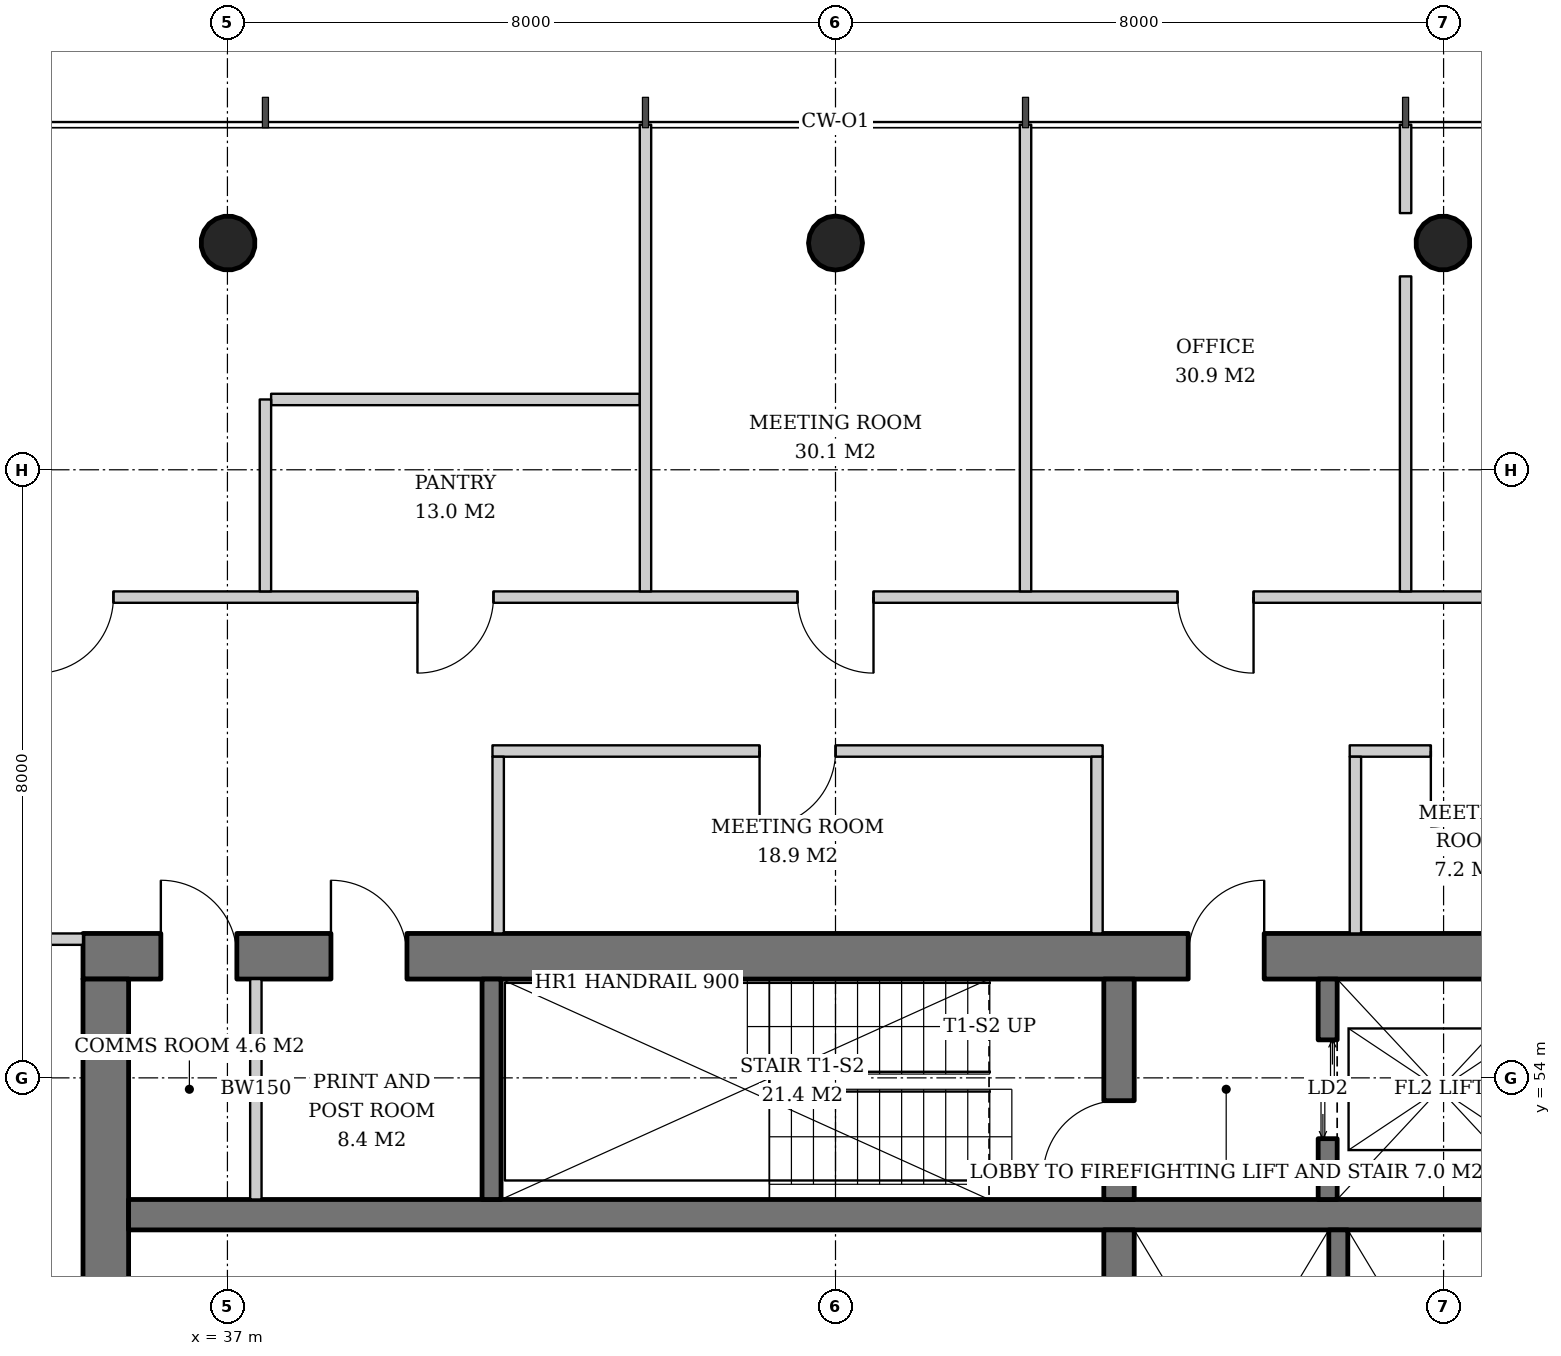
"""IFC4 building model, lengths in metres.
Left out: names, types, materials, properties, quantities, classifications, styles, units other than length and angle.
Written with IfcOpenShell. Run it as: python <this file> out.ifc"""

import sys

from ifc_helpers import new_model, si_unit, direction, frame, frame_2d, origin, origin_2d, place, context, subcontext, project, spatial, rectangle, hollow_circle, extrude, element, fill, save


model = new_model("IFC4")
c1 = context("Model", 3, precision=1e-05, world=origin(), true_north=direction((0.0, 1.0)))
c2 = subcontext(c1, "Body", "Model", "MODEL_VIEW")
j1 = project(units=[si_unit("LENGTHUNIT", "METRE"), si_unit("PLANEANGLEUNIT", "RADIAN")], contexts=[c1])
p1 = place(None, origin())
s1 = spatial("IfcSite", under=j1, at=p1, CompositionType="ELEMENT")
p2 = place(p1, origin())
s2 = spatial("IfcBuilding", under=s1, at=p2, CompositionType="ELEMENT")
p3 = place(p2, frame((0.0, 0.0, 176.8)))
s3 = spatial("IfcBuildingStorey", under=s2, at=p3, CompositionType="ELEMENT", Elevation=176.8)
p4 = place(p3, frame((53.011, 65.021, 0.0), z_axis=(-0.015987204877, -0.031974409754, 0.999360818924), x_axis=(0.894427191, -0.4472135955, 0.0)))
e1 = element("IfcColumn", 1, at=p4, inside=s3, PredefinedType="COLUMN", context=c2, shape_type="SweptSolid", body=[
    extrude(hollow_circle(Radius=0.355, WallThickness=0.025, at=origin_2d()), origin(), (0.0, 0.0, 1.0), 3.802),
])
p5 = place(p3, frame((45.0, 65.021, 0.0), z_axis=(0.0, -0.031978496719, 0.999488557087), x_axis=(1.0, 0.0, 0.0)))
e2 = element("IfcColumn", 2, at=p5, inside=s3, PredefinedType="COLUMN", context=c2, shape_type="SweptSolid", body=[
    extrude(hollow_circle(Radius=0.355, WallThickness=0.025, at=origin_2d()), origin(), (0.0, 0.0, 1.0), 3.802),
])
p6 = place(p3, frame((36.989, 65.021, 0.0), z_axis=(0.015987204877, -0.031974409754, 0.999360818924), x_axis=(0.894427191, 0.4472135955, 0.0)))
e3 = element("IfcColumn", 3, at=p6, inside=s3, PredefinedType="COLUMN", context=c2, shape_type="SweptSolid", body=[
    extrude(hollow_circle(Radius=0.355, WallThickness=0.025, at=origin_2d()), origin(), (0.0, 0.0, 1.0), 3.802),
])
p7 = place(p3, frame((35.1, 55.6, 0.0), z_axis=(0.0, 0.0, 1.0), x_axis=(1.0, 0.0, 0.0)))
e4 = element("IfcWall", 4, at=p7, inside=s3, PredefinedType="SHEAR", context=c2, shape_type="SweptSolid", body=[
    extrude(rectangle(XDim=19.8, YDim=0.6, at=frame_2d((9.9, 0.0))), origin(), (0.0, 0.0, 1.0), 3.8),
])
p8 = place(p7, frame((14.54, 0.0, 0.0)))
e5 = element("IfcOpeningElement", 5, at=p8, cuts=e4, PredefinedType="OPENING", context=c2, shape_type="SweptSolid", body=[
    extrude(rectangle(XDim=1.0, YDim=2.1, at=frame_2d((0.5, 1.05))), frame((0.0, 0.31, 0.0), z_axis=(0.0, -1.0, 0.0), x_axis=(1.0, 0.0, 0.0)), (0.0, 0.0, 1.0), 0.62),
])
p9 = place(p7, frame((1.024, 0.0, 0.0)))
e6 = element("IfcOpeningElement", 6, at=p9, cuts=e4, PredefinedType="OPENING", context=c2, shape_type="SweptSolid", body=[
    extrude(rectangle(XDim=1.0, YDim=2.1, at=frame_2d((0.5, 1.05))), frame((0.0, 0.31, 0.0), z_axis=(0.0, -1.0, 0.0), x_axis=(1.0, 0.0, 0.0)), (0.0, 0.0, 1.0), 0.62),
])
p10 = place(p7, frame((3.262, 0.0, 0.0)))
e7 = element("IfcOpeningElement", 7, at=p10, cuts=e4, PredefinedType="OPENING", context=c2, shape_type="SweptSolid", body=[
    extrude(rectangle(XDim=1.0, YDim=2.1, at=frame_2d((0.5, 1.05))), frame((0.0, 0.31, 0.0), z_axis=(0.0, -1.0, 0.0), x_axis=(1.0, 0.0, 0.0)), (0.0, 0.0, 1.0), 0.62),
])
p11 = place(p3, frame((35.4, 36.7, 0.0), z_axis=(0.0, 0.0, 1.0), x_axis=(0.0, 1.0, 0.0)))
e8 = element("IfcWall", 8, at=p11, inside=s3, PredefinedType="SHEAR", context=c2, shape_type="SweptSolid", body=[
    extrude(rectangle(XDim=18.6, YDim=0.6, at=frame_2d((9.3, 0.0))), origin(), (0.0, 0.0, 1.0), 3.8),
])
p12 = place(p11, frame((8.4, 0.0, 0.0)))
e9 = element("IfcOpeningElement", 9, at=p12, cuts=e8, PredefinedType="OPENING", context=c2, shape_type="SweptSolid", body=[
    extrude(rectangle(XDim=1.8, YDim=2.4, at=frame_2d((0.9, 1.2))), frame((0.0, 0.31, 0.0), z_axis=(0.0, -1.0, 0.0), x_axis=(1.0, 0.0, 0.0)), (0.0, 0.0, 1.0), 0.62),
])
p13 = place(p3, frame((35.7, 52.2, 0.0), z_axis=(0.0, 0.0, 1.0), x_axis=(1.0, 0.0, 0.0)))
e10 = element("IfcWall", 10, at=p13, inside=s3, PredefinedType="SHEAR", context=c2, shape_type="SweptSolid", body=[
    extrude(rectangle(XDim=18.6, YDim=0.4, at=frame_2d((9.3, 0.0))), origin(), (0.0, 0.0, 1.0), 3.8),
])
p14 = place(p3, frame((48.73, 40.0, 0.0), z_axis=(0.0, 0.0, 1.0), x_axis=(0.0, 1.0, 0.0)))
e11 = element("IfcWall", 11, at=p14, inside=s3, PredefinedType="SHEAR", context=c2, shape_type="SweptSolid", body=[
    extrude(rectangle(XDim=12.0, YDim=0.4, at=frame_2d((6.0, 0.0))), origin(), (0.0, 0.0, 1.0), 3.8),
])
p15 = place(p3, frame((48.73, 52.4, 0.0), z_axis=(0.0, 0.0, 1.0), x_axis=(0.0, 1.0, 0.0)))
e12 = element("IfcWall", 12, at=p15, inside=s3, PredefinedType="SHEAR", context=c2, shape_type="SweptSolid", body=[
    extrude(rectangle(XDim=2.9, YDim=0.4, at=frame_2d((1.45, 0.0))), origin(), (0.0, 0.0, 1.0), 3.8),
])
p16 = place(p15, frame((0.3, 0.0, 0.0)))
e13 = element("IfcOpeningElement", 13, at=p16, cuts=e12, PredefinedType="OPENING", context=c2, shape_type="SweptSolid", body=[
    extrude(rectangle(XDim=1.0, YDim=2.1, at=frame_2d((0.5, 1.05))), frame((0.0, 0.21, 0.0), z_axis=(0.0, -1.0, 0.0), x_axis=(1.0, 0.0, 0.0)), (0.0, 0.0, 1.0), 0.42),
])
p17 = place(p3, frame((40.475, 52.4, 0.0), z_axis=(0.0, 0.0, 1.0), x_axis=(0.0, 1.0, 0.0)))
e14 = element("IfcWall", 14, at=p17, inside=s3, PredefinedType="SHEAR", context=c2, shape_type="SweptSolid", body=[
    extrude(rectangle(XDim=2.9, YDim=0.25, at=frame_2d((1.45, 0.0))), origin(), (0.0, 0.0, 1.0), 3.8),
])
p18 = place(p3, frame((51.475, 52.4, 0.0), z_axis=(0.0, 0.0, 1.0), x_axis=(0.0, 1.0, 0.0)))
e15 = element("IfcWall", 15, at=p18, inside=s3, PredefinedType="SHEAR", context=c2, shape_type="SweptSolid", body=[
    extrude(rectangle(XDim=2.9, YDim=0.25, at=frame_2d((1.45, 0.0))), origin(), (0.0, 0.0, 1.0), 3.8),
])
p19 = place(p18, frame((0.8, 0.0, 0.0)))
e16 = element("IfcOpeningElement", 16, at=p19, cuts=e15, PredefinedType="OPENING", context=c2, shape_type="SweptSolid", body=[
    extrude(rectangle(XDim=1.3, YDim=2.2, at=frame_2d((0.65, 1.1))), frame((0.0, 0.135, 0.0), z_axis=(0.0, -1.0, 0.0), x_axis=(1.0, 0.0, 0.0)), (0.0, 0.0, 1.0), 0.27),
])
p20 = place(p3, frame((51.615, 47.75, 0.0), z_axis=(0.0, 0.0, 1.0), x_axis=(0.0, 1.0, 0.0)))
e17 = element("IfcWall", 17, at=p20, inside=s3, PredefinedType="SHEAR", context=c2, shape_type="SweptSolid", body=[
    extrude(rectangle(XDim=4.25, YDim=0.25, at=frame_2d((2.125, 0.0))), origin(), (0.0, 0.0, 1.0), 3.8),
])
p21 = place(p3, frame((37.374, 52.4, 0.0), z_axis=(0.0, 0.0, 1.0), x_axis=(0.0, 1.0, 0.0)))
e18 = element("IfcWall", 18, at=p21, inside=s3, PredefinedType="SOLIDWALL", context=c2, shape_type="SweptSolid", body=[
    extrude(rectangle(XDim=2.9, YDim=0.15, at=frame_2d((1.45, 0.0))), origin(), (0.0, 0.0, 1.0), 3.62),
])
p22 = place(p3, frame((54.9, 58.3, 0.0), z_axis=(0.0, 0.0, 1.0), x_axis=(-1.0, 0.0, 0.0)))
e19 = element("IfcWall", 19, at=p22, inside=s3, PredefinedType="PARTITIONING", context=c2, shape_type="SweptSolid", body=[
    extrude(rectangle(XDim=3.135, YDim=0.15, at=frame_2d((1.567, 0.0))), origin(), (0.0, 0.0, 1.0), 2.92),
])
p23 = place(p22, frame((1.067, 0.0, 0.0)))
e20 = element("IfcOpeningElement", 20, at=p23, cuts=e19, PredefinedType="OPENING", context=c2, shape_type="SweptSolid", body=[
    extrude(rectangle(XDim=1.0, YDim=2.1, at=frame_2d((0.5, 1.05))), frame((0.0, 0.085, 0.0), z_axis=(0.0, -1.0, 0.0), x_axis=(1.0, 0.0, 0.0)), (0.0, 0.0, 1.0), 0.17),
])
p24 = place(p3, frame((51.84, 55.9, 0.0), z_axis=(0.0, 0.0, 1.0), x_axis=(0.0, 1.0, 0.0)))
e21 = element("IfcWall", 21, at=p24, inside=s3, PredefinedType="PARTITIONING", context=c2, shape_type="SweptSolid", body=[
    extrude(rectangle(XDim=2.325, YDim=0.15, at=frame_2d((1.163, 0.0))), origin(), (0.0, 0.0, 1.0), 3.62),
])
p25 = place(p3, frame((48.515, 58.3, 0.0), z_axis=(0.0, 0.0, 1.0), x_axis=(-1.0, 0.0, 0.0)))
e22 = element("IfcWall", 22, at=p25, inside=s3, PredefinedType="PARTITIONING", context=c2, shape_type="SweptSolid", body=[
    extrude(rectangle(XDim=8.028, YDim=0.15, at=frame_2d((4.014, 0.0))), origin(), (0.0, 0.0, 1.0), 2.867),
])
p26 = place(p25, frame((3.514, 0.0, 0.0)))
e23 = element("IfcOpeningElement", 23, at=p26, cuts=e22, PredefinedType="OPENING", context=c2, shape_type="SweptSolid", body=[
    extrude(rectangle(XDim=1.0, YDim=2.1, at=frame_2d((0.5, 1.05))), frame((0.0, 0.085, 0.0), z_axis=(0.0, -1.0, 0.0), x_axis=(1.0, 0.0, 0.0)), (0.0, 0.0, 1.0), 0.17),
])
for number, where, z_axis, x_axis in (
    (24, (48.44, 55.9, 0.0), (0.0, 0.0, 1.0), (0.0, 1.0, 0.0)),
    (25, (40.562, 55.9, 0.0), (0.0, 0.0, 1.0), (0.0, 1.0, 0.0)),
):
    element("IfcWall", number, at=place(p3, frame(where, z_axis=z_axis, x_axis=x_axis)), inside=s3, PredefinedType="PARTITIONING", context=c2, shape_type="SweptSolid", body=[
        extrude(rectangle(XDim=2.325, YDim=0.15, at=frame_2d((1.163, 0.0))), origin(), (0.0, 0.0, 1.0), 3.62),
    ])
p27 = place(p3, frame((35.1, 55.825, 0.0), z_axis=(0.0, 0.0, 1.0), x_axis=(-1.0, 0.0, 0.0)))
e26 = element("IfcWall", 26, at=p27, inside=s3, PredefinedType="PARTITIONING", context=c2, shape_type="SweptSolid", body=[
    extrude(rectangle(XDim=2.325, YDim=0.15, at=frame_2d((1.163, 0.0))), origin(), (0.0, 0.0, 1.0), 2.867),
])
p28 = place(p3, frame((42.425, 62.925, 0.0), z_axis=(0.0, 0.0, 1.0), x_axis=(-1.0, 0.0, 0.0)))
e27 = element("IfcWall", 27, at=p28, inside=s3, PredefinedType="PARTITIONING", context=c2, shape_type="SweptSolid", body=[
    extrude(rectangle(XDim=4.85, YDim=0.15, at=frame_2d((2.425, 0.0))), origin(), (0.0, 0.0, 1.0), 2.867),
])
p29 = place(p3, frame((58.786, 60.325, 0.0), z_axis=(0.0, 0.0, 1.0), x_axis=(-1.0, 0.0, 0.0)))
e28 = element("IfcWall", 28, at=p29, inside=s3, PredefinedType="PARTITIONING", context=c2, shape_type="SweptSolid", body=[
    extrude(rectangle(XDim=27.572, YDim=0.15, at=frame_2d((13.786, 0.0))), origin(), (0.0, 0.0, 1.0), 2.867),
])
p30 = place(p29, frame((3.286, 0.0, 0.0)))
e29 = element("IfcOpeningElement", 29, at=p30, cuts=e28, PredefinedType="OPENING", context=c2, shape_type="SweptSolid", body=[
    extrude(rectangle(XDim=1.0, YDim=2.1, at=frame_2d((0.5, 1.05))), frame((0.0, 0.085, 0.0), z_axis=(0.0, -1.0, 0.0), x_axis=(1.0, 0.0, 0.0)), (0.0, 0.0, 1.0), 0.17),
])
p31 = place(p29, frame((8.286, 0.0, 0.0)))
e30 = element("IfcOpeningElement", 30, at=p31, cuts=e28, PredefinedType="OPENING", context=c2, shape_type="SweptSolid", body=[
    extrude(rectangle(XDim=1.0, YDim=2.1, at=frame_2d((0.5, 1.05))), frame((0.0, 0.085, 0.0), z_axis=(0.0, -1.0, 0.0), x_axis=(1.0, 0.0, 0.0)), (0.0, 0.0, 1.0), 0.17),
])
p32 = place(p29, frame((13.286, 0.0, 0.0)))
e31 = element("IfcOpeningElement", 31, at=p32, cuts=e28, PredefinedType="OPENING", context=c2, shape_type="SweptSolid", body=[
    extrude(rectangle(XDim=1.0, YDim=2.1, at=frame_2d((0.5, 1.05))), frame((0.0, 0.085, 0.0), z_axis=(0.0, -1.0, 0.0), x_axis=(1.0, 0.0, 0.0)), (0.0, 0.0, 1.0), 0.17),
])
p33 = place(p29, frame((18.286, 0.0, 0.0)))
e32 = element("IfcOpeningElement", 32, at=p33, cuts=e28, PredefinedType="OPENING", context=c2, shape_type="SweptSolid", body=[
    extrude(rectangle(XDim=1.0, YDim=2.1, at=frame_2d((0.5, 1.05))), frame((0.0, 0.085, 0.0), z_axis=(0.0, -1.0, 0.0), x_axis=(1.0, 0.0, 0.0)), (0.0, 0.0, 1.0), 0.17),
])
p34 = place(p29, frame((23.286, 0.0, 0.0)))
e33 = element("IfcOpeningElement", 33, at=p34, cuts=e28, PredefinedType="OPENING", context=c2, shape_type="SweptSolid", body=[
    extrude(rectangle(XDim=1.0, YDim=2.1, at=frame_2d((0.5, 1.05))), frame((0.0, 0.085, 0.0), z_axis=(0.0, -1.0, 0.0), x_axis=(1.0, 0.0, 0.0)), (0.0, 0.0, 1.0), 0.17),
])
p35 = place(p3, frame((52.5, 60.4, 0.0), z_axis=(0.0, 0.0, 1.0), x_axis=(0.0, 1.0, 0.0)))
e34 = element("IfcWall", 34, at=p35, inside=s3, PredefinedType="PARTITIONING", context=c2, shape_type="SweptSolid", body=[
    extrude(rectangle(XDim=4.145, YDim=0.15, at=frame_2d((2.072, 0.0))), origin(), (0.0, 0.0, 1.0), 3.62),
])
p36 = place(p3, frame((52.5, 65.377, 0.0), z_axis=(0.0, 0.0, 1.0), x_axis=(0.0, 1.0, 0.0)))
e35 = element("IfcWall", 35, at=p36, inside=s3, PredefinedType="PARTITIONING", context=c2, shape_type="SweptSolid", body=[
    extrude(rectangle(XDim=1.163, YDim=0.15, at=frame_2d((0.582, 0.0))), origin(), (0.0, 0.0, 1.0), 3.62),
])
p37 = place(p3, frame((47.5, 60.4, 0.0), z_axis=(0.0, 0.0, 1.0), x_axis=(0.0, 1.0, 0.0)))
e36 = element("IfcWall", 36, at=p37, inside=s3, PredefinedType="PARTITIONING", context=c2, shape_type="SweptSolid", body=[
    extrude(rectangle(XDim=6.14, YDim=0.15, at=frame_2d((3.07, 0.0))), origin(), (0.0, 0.0, 1.0), 3.12),
])
p38 = place(p3, frame((42.5, 60.4, 0.0), z_axis=(0.0, 0.0, 1.0), x_axis=(0.0, 1.0, 0.0)))
e37 = element("IfcWall", 37, at=p38, inside=s3, PredefinedType="PARTITIONING", context=c2, shape_type="SweptSolid", body=[
    extrude(rectangle(XDim=6.14, YDim=0.15, at=frame_2d((3.07, 0.0))), origin(), (0.0, 0.0, 1.0), 2.867),
])
p39 = place(p3, frame((37.5, 60.4, 0.0), z_axis=(0.0, 0.0, 1.0), x_axis=(0.0, 1.0, 0.0)))
e38 = element("IfcWall", 38, at=p39, inside=s3, PredefinedType="PARTITIONING", context=c2, shape_type="SweptSolid", body=[
    extrude(rectangle(XDim=2.525, YDim=0.15, at=frame_2d((1.263, 0.0))), origin(), (0.0, 0.0, 1.0), 3.62),
])
p40 = place(p19, origin())
e39 = element("IfcDoor", 39, at=p40, inside=s3, OperationType="DOUBLE_DOOR_SLIDING", PredefinedType="DOOR", context=c2, shape_type="SweptSolid", body=[
    extrude(rectangle(XDim=1.3, YDim=2.2, at=frame_2d((0.65, 1.1))), frame((0.0, 0.025, 0.0), z_axis=(0.0, -1.0, 0.0), x_axis=(1.0, 0.0, 0.0)), (0.0, 0.0, 1.0), 0.05),
])
fill(e16, e39)
p41 = place(p16, origin())
e40 = element("IfcDoor", 40, at=p41, inside=s3, OperationType="SINGLE_SWING_LEFT", PredefinedType="DOOR", context=c2, shape_type="SweptSolid", body=[
    extrude(rectangle(XDim=1.0, YDim=2.1, at=frame_2d((0.5, 1.05))), frame((0.0, 0.025, 0.0), z_axis=(0.0, -1.0, 0.0), x_axis=(1.0, 0.0, 0.0)), (0.0, 0.0, 1.0), 0.05),
])
fill(e13, e40)
p42 = place(p8, origin())
e41 = element("IfcDoor", 41, at=p42, inside=s3, OperationType="SINGLE_SWING_RIGHT", PredefinedType="DOOR", context=c2, shape_type="SweptSolid", body=[
    extrude(rectangle(XDim=1.0, YDim=2.1, at=frame_2d((0.5, 1.05))), frame((0.0, 0.025, 0.0), z_axis=(0.0, -1.0, 0.0), x_axis=(1.0, 0.0, 0.0)), (0.0, 0.0, 1.0), 0.05),
])
fill(e5, e41)
p43 = place(p9, origin())
e42 = element("IfcDoor", 42, at=p43, inside=s3, OperationType="SINGLE_SWING_LEFT", PredefinedType="DOOR", context=c2, shape_type="SweptSolid", body=[
    extrude(rectangle(XDim=1.0, YDim=2.1, at=frame_2d((0.5, 1.05))), frame((0.0, -0.24, 0.0), z_axis=(0.0, -1.0, 0.0), x_axis=(1.0, 0.0, 0.0)), (0.0, 0.0, 1.0), 0.05),
])
fill(e6, e42)
p44 = place(p10, origin())
e43 = element("IfcDoor", 43, at=p44, inside=s3, OperationType="SINGLE_SWING_LEFT", PredefinedType="DOOR", context=c2, shape_type="SweptSolid", body=[
    extrude(rectangle(XDim=1.0, YDim=2.1, at=frame_2d((0.5, 1.05))), frame((0.0, -0.24, 0.0), z_axis=(0.0, -1.0, 0.0), x_axis=(1.0, 0.0, 0.0)), (0.0, 0.0, 1.0), 0.05),
])
fill(e7, e43)
p45 = place(p23, origin())
e44 = element("IfcDoor", 44, at=p45, inside=s3, OperationType="SINGLE_SWING_RIGHT", PredefinedType="DOOR", context=c2, shape_type="SweptSolid", body=[
    extrude(rectangle(XDim=1.0, YDim=2.1, at=frame_2d((0.5, 1.05))), frame((0.0, 0.025, 0.0), z_axis=(0.0, -1.0, 0.0), x_axis=(1.0, 0.0, 0.0)), (0.0, 0.0, 1.0), 0.05),
])
fill(e20, e44)
p46 = place(p26, origin())
e45 = element("IfcDoor", 45, at=p46, inside=s3, OperationType="SINGLE_SWING_RIGHT", PredefinedType="DOOR", context=c2, shape_type="SweptSolid", body=[
    extrude(rectangle(XDim=1.0, YDim=2.1, at=frame_2d((0.5, 1.05))), frame((0.0, 0.025, 0.0), z_axis=(0.0, -1.0, 0.0), x_axis=(1.0, 0.0, 0.0)), (0.0, 0.0, 1.0), 0.05),
])
fill(e23, e45)
p47 = place(p31, origin())
e46 = element("IfcDoor", 46, at=p47, inside=s3, OperationType="SINGLE_SWING_LEFT", PredefinedType="DOOR", context=c2, shape_type="SweptSolid", body=[
    extrude(rectangle(XDim=1.0, YDim=2.1, at=frame_2d((0.5, 1.05))), frame((0.0, 0.025, 0.0), z_axis=(0.0, -1.0, 0.0), x_axis=(1.0, 0.0, 0.0)), (0.0, 0.0, 1.0), 0.05),
])
fill(e30, e46)
p48 = place(p32, origin())
e47 = element("IfcDoor", 47, at=p48, inside=s3, OperationType="SINGLE_SWING_LEFT", PredefinedType="DOOR", context=c2, shape_type="SweptSolid", body=[
    extrude(rectangle(XDim=1.0, YDim=2.1, at=frame_2d((0.5, 1.05))), frame((0.0, 0.025, 0.0), z_axis=(0.0, -1.0, 0.0), x_axis=(1.0, 0.0, 0.0)), (0.0, 0.0, 1.0), 0.05),
])
fill(e31, e47)
p49 = place(p33, origin())
e48 = element("IfcDoor", 48, at=p49, inside=s3, OperationType="SINGLE_SWING_RIGHT", PredefinedType="DOOR", context=c2, shape_type="SweptSolid", body=[
    extrude(rectangle(XDim=1.0, YDim=2.1, at=frame_2d((0.5, 1.05))), frame((0.0, 0.025, 0.0), z_axis=(0.0, -1.0, 0.0), x_axis=(1.0, 0.0, 0.0)), (0.0, 0.0, 1.0), 0.05),
])
fill(e32, e48)
p50 = place(p34, origin())
e49 = element("IfcDoor", 49, at=p50, inside=s3, OperationType="SINGLE_SWING_RIGHT", PredefinedType="DOOR", context=c2, shape_type="SweptSolid", body=[
    extrude(rectangle(XDim=1.0, YDim=2.1, at=frame_2d((0.5, 1.05))), frame((0.0, 0.025, 0.0), z_axis=(0.0, -1.0, 0.0), x_axis=(1.0, 0.0, 0.0)), (0.0, 0.0, 1.0), 0.05),
])
fill(e33, e49)
save(model, sys.argv[1])
